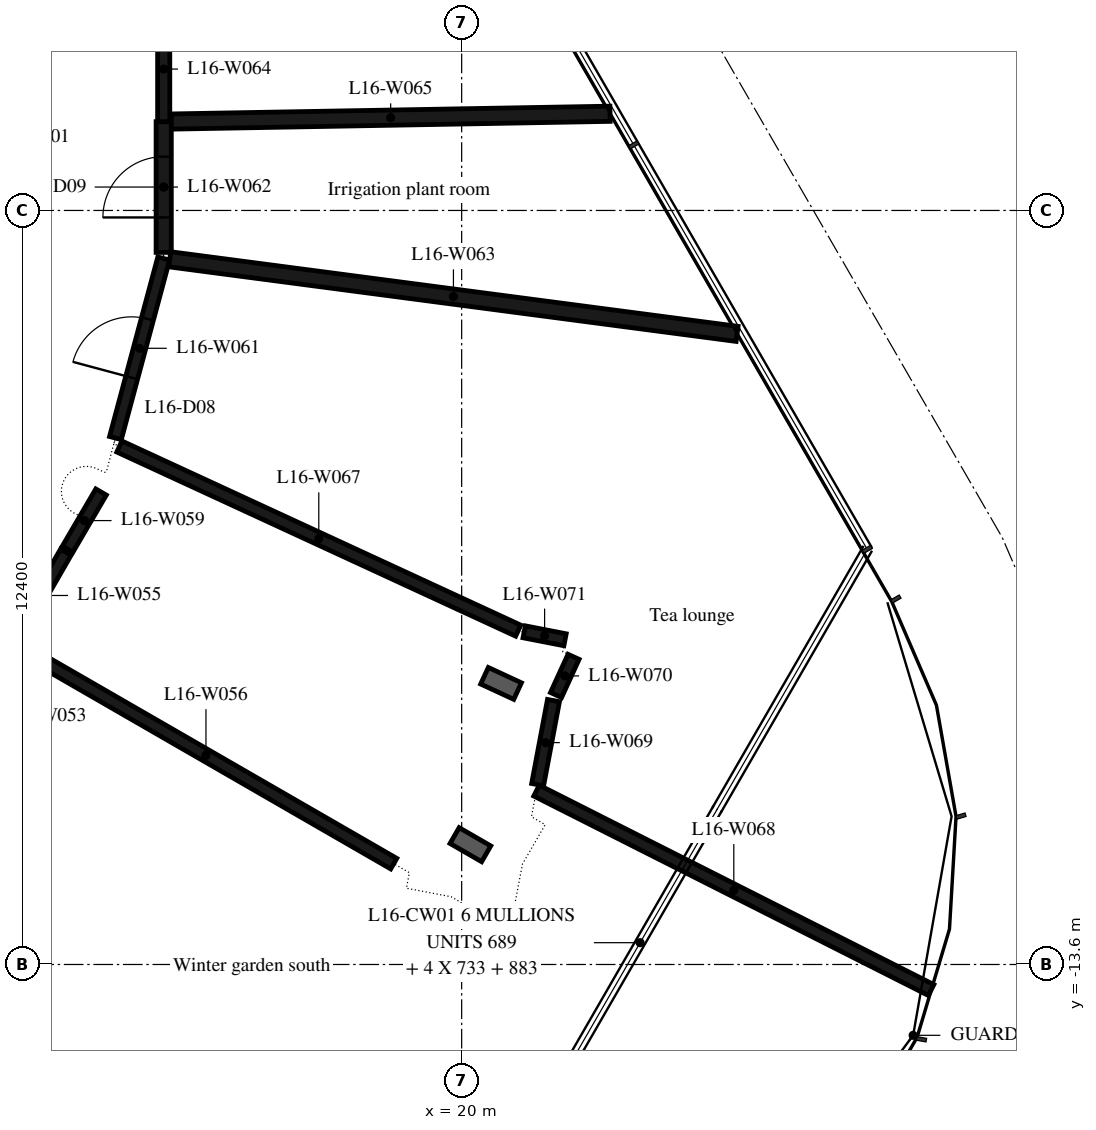
"""IFC4 building model, lengths in metres.
Left out: names, types, materials, properties, quantities, classifications, styles, units other than length and angle.
Written with IfcOpenShell. Run it as: python <this file> out.ifc"""

import sys

from ifc_helpers import new_model, si_unit, direction, frame, frame_2d, origin, place, context, subcontext, project, spatial, rectangle, extrude, element, fill, save


model = new_model("IFC4")
c1 = context("Model", 3, precision=1e-05, world=origin(), true_north=direction((0.0, 1.0)))
c2 = subcontext(c1, "Body", "Model", "MODEL_VIEW")
j1 = project(units=[si_unit("LENGTHUNIT", "METRE"), si_unit("PLANEANGLEUNIT", "RADIAN")], contexts=[c1])
p1 = place(None, origin())
s1 = spatial("IfcSite", under=j1, at=p1, CompositionType="ELEMENT")
p2 = place(p1, origin())
s2 = spatial("IfcBuilding", under=s1, at=p2, CompositionType="ELEMENT")
p3 = place(p2, frame((0.0, 0.0, 69.9)))
s3 = spatial("IfcBuildingStorey", under=s2, at=p3, CompositionType="ELEMENT", Elevation=69.9)
p4 = place(p3, frame((12.67, -8.243, 0.0), z_axis=(0.0, 0.0, 1.0), x_axis=(0.499224871441, 0.866472462191, 0.0)))
e1 = element("IfcWall", 1, at=p4, inside=s3, PredefinedType="PARTITIONING", context=c2, shape_type="SweptSolid", body=[
    extrude(rectangle(XDim=1.643, YDim=0.2, at=frame_2d((0.821, 0.0))), origin(), (0.0, 0.0, 1.0), 6.35),
])
p5 = place(p3, frame((12.707, -8.38, 0.0), z_axis=(0.0, 0.0, 1.0), x_axis=(0.866276777452, -0.49956435506, 0.0)))
e2 = element("IfcWall", 2, at=p5, inside=s3, PredefinedType="PARTITIONING", context=c2, shape_type="SweptSolid", body=[
    extrude(rectangle(XDim=7.13, YDim=0.2, at=frame_2d((3.565, 0.0))), origin(), (0.0, 0.0, 1.0), 6.35),
])
p6 = place(p3, frame((13.52, -6.77, 0.0), z_axis=(0.0, 0.0, 1.0), x_axis=(0.505069244795, 0.863078824883, 0.0)))
e3 = element("IfcWall", 3, at=p6, inside=s3, PredefinedType="PARTITIONING", context=c2, shape_type="SweptSolid", body=[
    extrude(rectangle(XDim=1.089, YDim=0.2, at=frame_2d((0.544, 0.0))), origin(), (0.0, 0.0, 1.0), 6.35),
])
p7 = place(p3, frame((14.306, -4.943, 0.0), z_axis=(0.0, 0.0, 1.0), x_axis=(0.259684315005, 0.965693562441, 0.0)))
e4 = element("IfcWall", 4, at=p7, inside=s3, PredefinedType="PARTITIONING", context=c2, shape_type="SweptSolid", body=[
    extrude(rectangle(XDim=3.058, YDim=0.2, at=frame_2d((1.529, 0.0))), origin(), (0.0, 0.0, 1.0), 6.35),
])
p8 = place(p7, frame((1.029, 0.0, 0.0)))
e5 = element("IfcOpeningElement", 5, at=p8, cuts=e4, PredefinedType="OPENING", context=c2, shape_type="SweptSolid", body=[
    extrude(rectangle(XDim=1.0, YDim=2.1, at=frame_2d((0.5, 1.05))), frame((0.0, 0.11, 0.0), z_axis=(0.0, -1.0, 0.0), x_axis=(1.0, 0.0, 0.0)), (0.0, 0.0, 1.0), 0.22),
])
p9 = place(p3, frame((15.1, -1.89, 0.0), z_axis=(0.0, 0.0, 1.0), x_axis=(0.0, 1.0, 0.0)))
e6 = element("IfcWall", 6, at=p9, inside=s3, PredefinedType="PARTITIONING", context=c2, shape_type="SweptSolid", body=[
    extrude(rectangle(XDim=2.15, YDim=0.25, at=frame_2d((1.075, 0.0))), origin(), (0.0, 0.0, 1.0), 6.35),
])
p10 = place(p9, frame((0.575, 0.0, 0.0)))
e7 = element("IfcOpeningElement", 7, at=p10, cuts=e6, PredefinedType="OPENING", context=c2, shape_type="SweptSolid", body=[
    extrude(rectangle(XDim=1.0, YDim=2.1, at=frame_2d((0.5, 1.05))), frame((0.0, 0.135, 0.0), z_axis=(0.0, -1.0, 0.0), x_axis=(1.0, 0.0, 0.0)), (0.0, 0.0, 1.0), 0.27),
])
p11 = place(p3, frame((15.199, -2.003, 0.0), z_axis=(0.0, 0.0, 1.0), x_axis=(0.991463740717, -0.130382709146, 0.0)))
e8 = element("IfcWall", 8, at=p11, inside=s3, PredefinedType="PARTITIONING", context=c2, shape_type="SweptSolid", body=[
    extrude(rectangle(XDim=9.411, YDim=0.25, at=frame_2d((4.706, 0.0))), origin(), (0.0, 0.0, 1.0), 6.35),
])
p12 = place(p3, frame((15.1, 0.26, 0.0), z_axis=(0.0, 0.0, 1.0), x_axis=(0.0, 1.0, 0.0)))
e9 = element("IfcWall", 9, at=p12, inside=s3, PredefinedType="PARTITIONING", context=c2, shape_type="SweptSolid", body=[
    extrude(rectangle(XDim=1.73, YDim=0.2, at=frame_2d((0.865, 0.0))), origin(), (0.0, 0.0, 1.0), 6.35),
])
p13 = place(p3, frame((15.225, 0.262, 0.0), z_axis=(0.0, 0.0, 1.0), x_axis=(0.99984343394, 0.017694846912, 0.0)))
e10 = element("IfcWall", 10, at=p13, inside=s3, PredefinedType="PARTITIONING", context=c2, shape_type="SweptSolid", body=[
    extrude(rectangle(XDim=7.216, YDim=0.25, at=frame_2d((3.608, 0.0))), origin(), (0.0, 0.0, 1.0), 6.35),
])
p14 = place(p3, frame((20.93, -8.11, 0.0), z_axis=(0.0, 0.0, 1.0), x_axis=(-0.907916848499, 0.419150326507, 0.0)))
e11 = element("IfcWall", 11, at=p14, inside=s3, PredefinedType="PARTITIONING", context=c2, shape_type="SweptSolid", body=[
    extrude(rectangle(XDim=7.224, YDim=0.2, at=frame_2d((3.612, 0.0))), origin(), (0.0, 0.0, 1.0), 6.35),
])
p15 = place(p3, frame((21.231, -10.74, 0.0), z_axis=(0.0, 0.0, 1.0), x_axis=(0.892491459774, -0.451064290573, 0.0)))
e12 = element("IfcWall", 12, at=p15, inside=s3, PredefinedType="PARTITIONING", context=c2, shape_type="SweptSolid", body=[
    extrude(rectangle(XDim=7.271, YDim=0.2, at=frame_2d((3.635, 0.0))), origin(), (0.0, 0.0, 1.0), 6.35),
])
p16 = place(p3, frame((21.51, -9.26, 0.0), z_axis=(0.0, 0.0, 1.0), x_axis=(-0.185189665268, -0.982702797329, 0.0)))
e13 = element("IfcWall", 13, at=p16, inside=s3, PredefinedType="PARTITIONING", context=c2, shape_type="SweptSolid", body=[
    extrude(rectangle(XDim=1.407, YDim=0.2, at=frame_2d((0.703, 0.0))), origin(), (0.0, 0.0, 1.0), 6.35),
])
p17 = place(p3, frame((21.552, -9.169, 0.0), z_axis=(0.0, 0.0, 1.0), x_axis=(0.416618269339, 0.909081524206, 0.0)))
e14 = element("IfcWall", 14, at=p17, inside=s3, PredefinedType="PARTITIONING", context=c2, shape_type="SweptSolid", body=[
    extrude(rectangle(XDim=0.692, YDim=0.2, at=frame_2d((0.346, 0.0))), origin(), (0.0, 0.0, 1.0), 6.35),
])
p18 = place(p3, frame((21.7, -8.26, 0.0), z_axis=(0.0, 0.0, 1.0), x_axis=(-0.981555941324, 0.191175139735, 0.0)))
e15 = element("IfcWall", 15, at=p18, inside=s3, PredefinedType="PARTITIONING", context=c2, shape_type="SweptSolid", body=[
    extrude(rectangle(XDim=0.685, YDim=0.2, at=frame_2d((0.342, 0.0))), origin(), (0.0, 0.0, 1.0), 6.35),
])
p19 = place(p8, origin())
e16 = element("IfcDoor", 16, at=p19, inside=s3, OperationType="SINGLE_SWING_LEFT", PredefinedType="DOOR", context=c2, shape_type="SweptSolid", body=[
    extrude(rectangle(XDim=1.0, YDim=2.1, at=frame_2d((0.5, 1.05))), frame((0.0, 0.025, 0.0), z_axis=(0.0, -1.0, 0.0), x_axis=(1.0, 0.0, 0.0)), (0.0, 0.0, 1.0), 0.05),
])
fill(e5, e16)
p20 = place(p10, origin())
e17 = element("IfcDoor", 17, at=p20, inside=s3, OperationType="SINGLE_SWING_LEFT", PredefinedType="DOOR", context=c2, shape_type="SweptSolid", body=[
    extrude(rectangle(XDim=1.0, YDim=2.1, at=frame_2d((0.5, 1.05))), frame((0.0, 0.025, 0.0), z_axis=(0.0, -1.0, 0.0), x_axis=(1.0, 0.0, 0.0)), (0.0, 0.0, 1.0), 0.05),
])
fill(e7, e17)
save(model, sys.argv[1])
